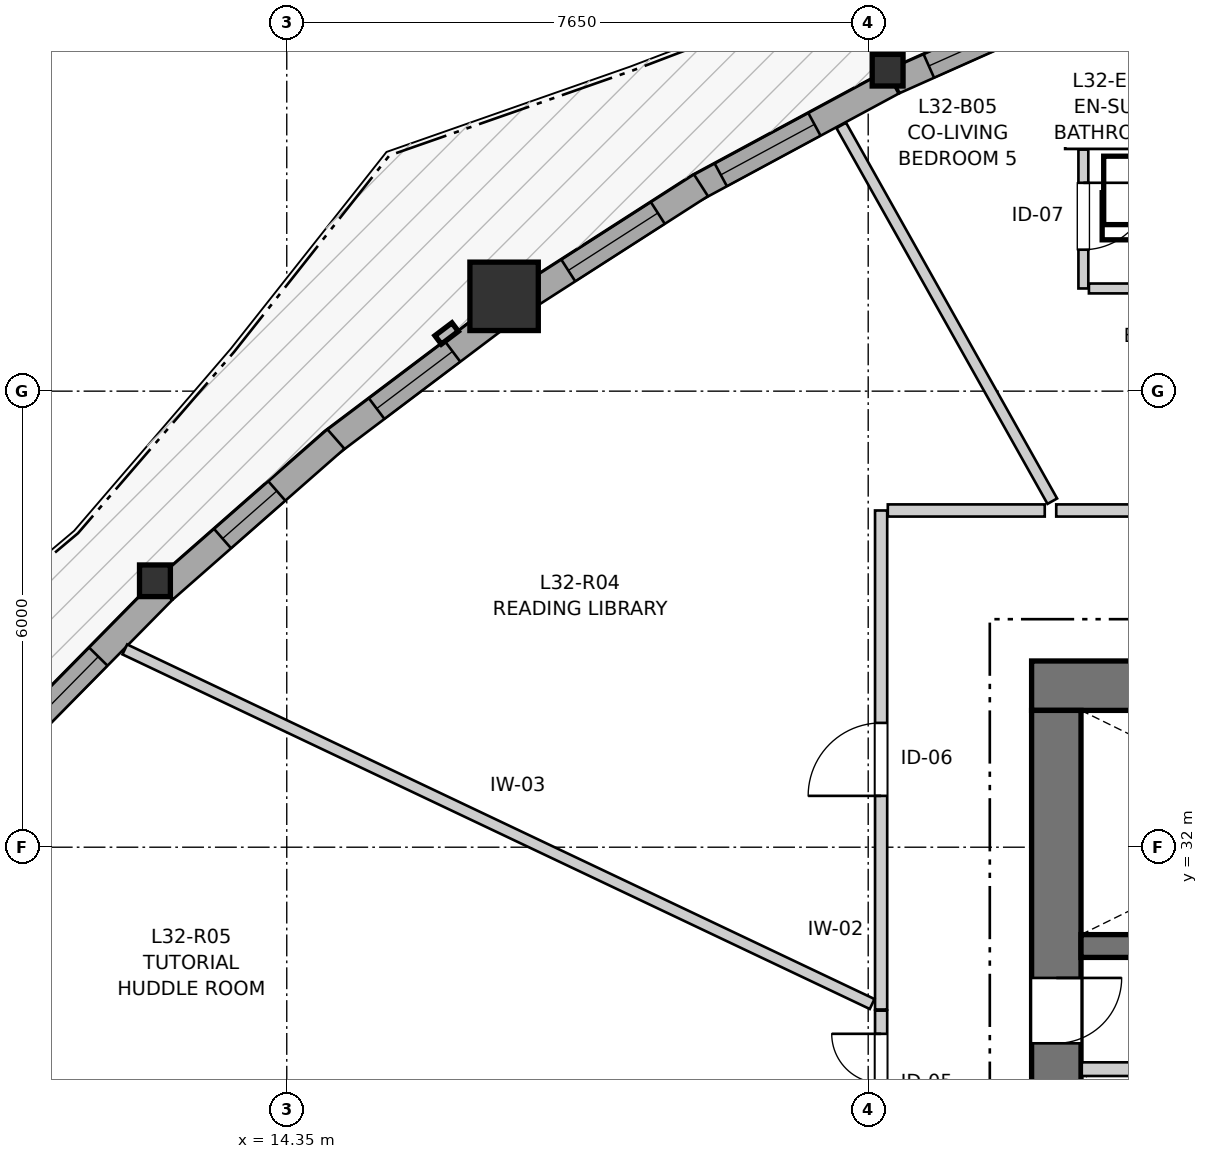
"""IFC4 building model, lengths in metres.
Left out: names, types, materials, properties, quantities, classifications, styles, units other than length and angle.
Written with IfcOpenShell. Run it as: python <this file> out.ifc"""

import sys

from ifc_helpers import new_model, si_unit, direction, frame, frame_2d, origin, origin_2d, place, context, subcontext, project, spatial, rectangle, i_section, extrude, source, transform, mapped, element, fill, save


model = new_model("IFC4")
c1 = context("Model", 3, precision=1e-05, world=origin(), true_north=direction((0.0, 1.0)))
c2 = subcontext(c1, "Body", "Model", "MODEL_VIEW")
j1 = project(units=[si_unit("LENGTHUNIT", "METRE"), si_unit("PLANEANGLEUNIT", "RADIAN")], contexts=[c1])
p1 = place(None, origin())
s1 = spatial("IfcSite", under=j1, at=p1, CompositionType="ELEMENT")
p2 = place(p1, origin())
s2 = spatial("IfcBuilding", under=s1, at=p2, CompositionType="ELEMENT")
p3 = place(p2, frame((0.0, 0.0, 108.8)))
s3 = spatial("IfcBuildingStorey", under=s2, at=p3, CompositionType="ELEMENT", Elevation=108.8)
p4 = place(p3, frame((36.55, 34.125, 0.0), z_axis=(0.0, 0.0, 1.0), x_axis=(-1.0, 0.0, 0.0)))
e1 = element("IfcWall", 1, at=p4, inside=s3, PredefinedType="SHEAR", context=c2, shape_type="SweptSolid", body=[
    extrude(rectangle(XDim=12.4, YDim=0.65, at=frame_2d((6.2, 0.0))), origin(), (0.0, 0.0, 1.0), 2.935),
])
p5 = place(p3, frame((24.475, 33.8, 0.0), z_axis=(0.0, 0.0, 1.0), x_axis=(0.0, -1.0, 0.0)))
e2 = element("IfcWall", 2, at=p5, inside=s3, PredefinedType="SHEAR", context=c2, shape_type="SweptSolid", body=[
    extrude(rectangle(XDim=15.6, YDim=0.65, at=frame_2d((7.8, 0.0))), origin(), (0.0, 0.0, 1.0), 2.935),
])
p6 = place(p5, frame((7.05, 0.0, 0.0)))
e3 = element("IfcOpeningElement", 3, at=p6, cuts=e2, PredefinedType="OPENING", context=c2, shape_type="SweptSolid", body=[
    extrude(rectangle(XDim=1.5, YDim=2.15, at=frame_2d((0.75, 1.075))), frame((0.0, 0.335, 0.0), z_axis=(0.0, -1.0, 0.0), x_axis=(1.0, 0.0, 0.0)), (0.0, 0.0, 1.0), 0.67),
])
p7 = place(p5, frame((3.52, 0.0, 0.0)))
e4 = element("IfcOpeningElement", 4, at=p7, cuts=e2, PredefinedType="OPENING", context=c2, shape_type="SweptSolid", body=[
    extrude(rectangle(XDim=0.86, YDim=2.05, at=frame_2d((0.43, 1.025))), frame((0.0, 0.335, 0.0), z_axis=(0.0, -1.0, 0.0), x_axis=(1.0, 0.0, 0.0)), (0.0, 0.0, 1.0), 0.67),
])
p8 = place(p5, frame((11.22, 0.0, 0.0)))
e5 = element("IfcOpeningElement", 5, at=p8, cuts=e2, PredefinedType="OPENING", context=c2, shape_type="SweptSolid", body=[
    extrude(rectangle(XDim=0.86, YDim=2.05, at=frame_2d((0.43, 1.025))), frame((0.0, 0.335, 0.0), z_axis=(0.0, -1.0, 0.0), x_axis=(1.0, 0.0, 0.0)), (0.0, 0.0, 1.0), 0.67),
])
p9 = place(p3, frame((24.8, 30.7, 0.0), z_axis=(0.0, 0.0, 1.0), x_axis=(1.0, 0.0, 0.0)))
e6 = element("IfcWall", 6, at=p9, inside=s3, PredefinedType="SHEAR", context=c2, shape_type="SweptSolid", body=[
    extrude(rectangle(XDim=11.1, YDim=0.3, at=frame_2d((5.55, 0.0))), origin(), (0.0, 0.0, 1.0), 2.935),
])
p10 = place(p9, frame((6.22, 0.0, 0.0)))
e7 = element("IfcOpeningElement", 7, at=p10, cuts=e6, PredefinedType="OPENING", context=c2, shape_type="SweptSolid", body=[
    extrude(rectangle(XDim=0.98, YDim=2.15, at=frame_2d((0.49, 1.075))), frame((0.0, 0.16, 0.0), z_axis=(0.0, -1.0, 0.0), x_axis=(1.0, 0.0, 0.0)), (0.0, 0.0, 1.0), 0.32),
])
p11 = place(p9, frame((9.15, 0.0, 0.0)))
e8 = element("IfcOpeningElement", 8, at=p11, cuts=e6, PredefinedType="OPENING", context=c2, shape_type="SweptSolid", body=[
    extrude(rectangle(XDim=1.15, YDim=2.15, at=frame_2d((0.575, 1.075))), frame((0.0, 0.16, 0.0), z_axis=(0.0, -1.0, 0.0), x_axis=(1.0, 0.0, 0.0)), (0.0, 0.0, 1.0), 0.32),
])
m1 = source(origin(), c2, "Body", "SweptSolid", [
    extrude(i_section(OverallWidth=0.406, OverallDepth=0.416, WebThickness=0.027, FlangeThickness=0.044, FilletRadius=0.015, at=origin_2d()), origin(), (0.0, 0.0, 1.0), 2.935),
])
p12 = place(p3, frame((22.256, 42.222, 0.0), z_axis=(0.0, 0.0, 1.0), x_axis=(1.0, 0.0, 0.0)))
e9 = element("IfcColumn", 9, at=p12, inside=s3, PredefinedType="PILASTER", context=c2, shape_type="MappedRepresentation", body=[
    mapped(m1, transform((0.0, 0.0, 0.0), x_axis=(1.0, 0.0, 0.0), y_axis=(0.0, 1.0, 0.0), z_axis=(0.0, 0.0, 1.0), scale=1.0)),
])
m2 = source(origin(), c2, "Body", "SweptSolid", [
    extrude(rectangle(XDim=0.9, YDim=0.9, at=origin_2d()), origin(), (0.0, 0.0, 1.0), 2.935),
])
p13 = place(p3, frame((17.209, 39.247, 0.0), z_axis=(0.0, 0.0, 1.0), x_axis=(1.0, 0.0, 0.0)))
e10 = element("IfcColumn", 10, at=p13, inside=s3, PredefinedType="COLUMN", context=c2, shape_type="MappedRepresentation", body=[
    mapped(m2, transform((0.0, 0.0, 0.0), x_axis=(1.0, 0.0, 0.0), y_axis=(0.0, 1.0, 0.0), z_axis=(0.0, 0.0, 1.0), scale=1.0)),
])
p14 = place(p3, frame((12.616, 35.505, 0.0), z_axis=(0.0, 0.0, 1.0), x_axis=(1.0, 0.0, 0.0)))
e11 = element("IfcColumn", 11, at=p14, inside=s3, PredefinedType="PILASTER", context=c2, shape_type="MappedRepresentation", body=[
    mapped(m1, transform((0.0, 0.0, 0.0), x_axis=(1.0, 0.0, 0.0), y_axis=(0.0, 1.0, 0.0), z_axis=(0.0, 0.0, 1.0), scale=1.0)),
])
p15 = place(p3, frame((25.052, 43.283, 0.0), z_axis=(0.0, 0.0, 1.0), x_axis=(-0.913400340023, -0.407062426227, 0.0)))
e12 = element("IfcWall", 12, at=p15, inside=s3, PredefinedType="SOLIDWALL", context=c2, shape_type="SweptSolid", body=[
    extrude(rectangle(XDim=2.966, YDim=0.34, at=frame_2d((1.483, 0.0))), origin(), (0.0, 0.0, 1.0), 2.465),
])
p16 = place(p15, frame((0.518, 0.0, 0.82)))
e13 = element("IfcOpeningElement", 13, at=p16, cuts=e12, PredefinedType="OPENING", context=c2, shape_type="SweptSolid", body=[
    extrude(rectangle(XDim=1.95, YDim=1.4, at=frame_2d((0.975, 0.7))), frame((0.0, 0.18, 0.0), z_axis=(0.0, -1.0, 0.0), x_axis=(1.0, 0.0, 0.0)), (0.0, 0.0, 1.0), 0.36),
])
p17 = place(p3, frame((22.319, 42.063, 0.0), z_axis=(0.0, 0.0, 1.0), x_axis=(-0.880050731383, -0.4748796797, 0.0)))
e14 = element("IfcWall", 14, at=p17, inside=s3, PredefinedType="SOLIDWALL", context=c2, shape_type="SweptSolid", body=[
    extrude(rectangle(XDim=2.949, YDim=0.34, at=frame_2d((1.475, 0.0))), origin(), (0.0, 0.0, 1.0), 2.465),
])
p18 = place(p17, frame((1.166, 0.0, 0.82)))
e15 = element("IfcOpeningElement", 15, at=p18, cuts=e14, PredefinedType="OPENING", context=c2, shape_type="SweptSolid", body=[
    extrude(rectangle(XDim=1.4, YDim=1.35, at=frame_2d((0.7, 0.675))), frame((0.0, 0.18, 0.0), z_axis=(0.0, -1.0, 0.0), x_axis=(1.0, 0.0, 0.0)), (0.0, 0.0, 1.0), 0.36),
])
p19 = place(p3, frame((19.8, 40.708, 0.0), z_axis=(0.0, 0.0, 1.0), x_axis=(-0.841470838401, -0.540302533883, 0.0)))
e16 = element("IfcWall", 16, at=p19, inside=s3, PredefinedType="SOLIDWALL", context=c2, shape_type="SweptSolid", body=[
    extrude(rectangle(XDim=2.739, YDim=0.34, at=frame_2d((1.37, 0.0))), origin(), (0.0, 0.0, 1.0), 2.465),
])
p20 = place(p19, frame((0.675, 0.0, 0.82)))
e17 = element("IfcOpeningElement", 17, at=p20, cuts=e16, PredefinedType="OPENING", context=c2, shape_type="SweptSolid", body=[
    extrude(rectangle(XDim=1.4, YDim=1.35, at=frame_2d((0.7, 0.675))), frame((0.0, 0.18, 0.0), z_axis=(0.0, -1.0, 0.0), x_axis=(1.0, 0.0, 0.0)), (0.0, 0.0, 1.0), 0.36),
])
p21 = place(p3, frame((17.128, 38.973, 0.0), z_axis=(0.0, 0.0, 1.0), x_axis=(-0.798381200707, -0.602152354772, 0.0)))
e18 = element("IfcWall", 18, at=p21, inside=s3, PredefinedType="SOLIDWALL", context=c2, shape_type="SweptSolid", body=[
    extrude(rectangle(XDim=2.756, YDim=0.34, at=frame_2d((1.378, 0.0))), origin(), (0.0, 0.0, 1.0), 2.465),
])
p22 = place(p21, frame((0.748, 0.0, 0.82)))
e19 = element("IfcOpeningElement", 19, at=p22, cuts=e18, PredefinedType="OPENING", context=c2, shape_type="SweptSolid", body=[
    extrude(rectangle(XDim=1.25, YDim=1.35, at=frame_2d((0.625, 0.675))), frame((0.0, 0.18, 0.0), z_axis=(0.0, -1.0, 0.0), x_axis=(1.0, 0.0, 0.0)), (0.0, 0.0, 1.0), 0.36),
])
p23 = place(p3, frame((14.997, 37.37, 0.0), z_axis=(0.0, 0.0, 1.0), x_axis=(-0.751446130796, -0.659794447166, 0.0)))
e20 = element("IfcWall", 20, at=p23, inside=s3, PredefinedType="SOLIDWALL", context=c2, shape_type="SweptSolid", body=[
    extrude(rectangle(XDim=3.0, YDim=0.34, at=frame_2d((1.5, 0.0))), origin(), (0.0, 0.0, 1.0), 2.465),
])
p24 = place(p23, frame((1.035, 0.0, 0.82)))
e21 = element("IfcOpeningElement", 21, at=p24, cuts=e20, PredefinedType="OPENING", context=c2, shape_type="SweptSolid", body=[
    extrude(rectangle(XDim=0.95, YDim=1.35, at=frame_2d((0.475, 0.675))), frame((0.0, 0.18, 0.0), z_axis=(0.0, -1.0, 0.0), x_axis=(1.0, 0.0, 0.0)), (0.0, 0.0, 1.0), 0.36),
])
p25 = place(p3, frame((12.723, 35.372, 0.0), z_axis=(0.0, 0.0, 1.0), x_axis=(-0.701922597509, -0.71225323243, 0.0)))
e22 = element("IfcWall", 22, at=p25, inside=s3, PredefinedType="SOLIDWALL", context=c2, shape_type="SweptSolid", body=[
    extrude(rectangle(XDim=3.049, YDim=0.34, at=frame_2d((1.524, 0.0))), origin(), (0.0, 0.0, 1.0), 2.465),
])
p26 = place(p25, frame((1.214, 0.0, 0.82)))
e23 = element("IfcOpeningElement", 23, at=p26, cuts=e22, PredefinedType="OPENING", context=c2, shape_type="SweptSolid", body=[
    extrude(rectangle(XDim=1.45, YDim=1.25, at=frame_2d((0.725, 0.625))), frame((0.0, 0.18, 0.0), z_axis=(0.0, -1.0, 0.0), x_axis=(1.0, 0.0, 0.0)), (0.0, 0.0, 1.0), 0.36),
])
p27 = place(p3, frame((24.81, 29.08, 0.0), z_axis=(0.0, 0.0, 1.0), x_axis=(1.0, 0.0, 0.0)))
e24 = element("IfcWall", 24, at=p27, inside=s3, PredefinedType="PARTITIONING", context=c2, shape_type="SweptSolid", body=[
    extrude(rectangle(XDim=5.84, YDim=0.18, at=frame_2d((2.92, 0.0))), origin(), (0.0, 0.0, 1.0), 2.935),
])
p28 = place(p3, frame((22.17, 29.865, 0.0), z_axis=(0.0, 0.0, 1.0), x_axis=(0.0, 1.0, 0.0)))
e25 = element("IfcWall", 25, at=p28, inside=s3, PredefinedType="PARTITIONING", context=c2, shape_type="SweptSolid", body=[
    extrude(rectangle(XDim=6.565, YDim=0.16, at=frame_2d((3.282, 0.0))), origin(), (0.0, 0.0, 1.0), 2.935),
])
p29 = place(p28, frame((2.811, 0.0, 0.0)))
e26 = element("IfcOpeningElement", 26, at=p29, cuts=e25, PredefinedType="OPENING", context=c2, shape_type="SweptSolid", body=[
    extrude(rectangle(XDim=0.96, YDim=2.1, at=frame_2d((0.48, 1.05))), frame((0.0, 0.09, 0.0), z_axis=(0.0, -1.0, 0.0), x_axis=(1.0, 0.0, 0.0)), (0.0, 0.0, 1.0), 0.18),
])
p30 = place(p3, frame((24.474, 36.43, 0.0), z_axis=(0.0, 0.0, 1.0), x_axis=(1.0, 0.0, 0.0)))
e27 = element("IfcWall", 27, at=p30, inside=s3, PredefinedType="PARTITIONING", context=c2, shape_type="SweptSolid", body=[
    extrude(rectangle(XDim=2.914, YDim=0.16, at=frame_2d((1.457, 0.0))), origin(), (0.0, 0.0, 1.0), 2.573),
])
p31 = place(p30, frame((0.998, 0.0, 0.0)))
e28 = element("IfcOpeningElement", 28, at=p31, cuts=e27, PredefinedType="OPENING", context=c2, shape_type="SweptSolid", body=[
    extrude(rectangle(XDim=0.92, YDim=2.1, at=frame_2d((0.46, 1.05))), frame((0.0, 0.09, 0.0), z_axis=(0.0, -1.0, 0.0), x_axis=(1.0, 0.0, 0.0)), (0.0, 0.0, 1.0), 0.18),
])
p32 = place(p3, frame((22.17, 27.85, 0.0), z_axis=(0.0, 0.0, 1.0), x_axis=(0.0, 1.0, 0.0)))
e29 = element("IfcWall", 29, at=p32, inside=s3, PredefinedType="PARTITIONING", context=c2, shape_type="SweptSolid", body=[
    extrude(rectangle(XDim=2.0, YDim=0.16, at=frame_2d((1.0, 0.0))), origin(), (0.0, 0.0, 1.0), 2.935),
])
p33 = place(p32, frame((0.395, 0.0, 0.0)))
e30 = element("IfcOpeningElement", 30, at=p33, cuts=e29, PredefinedType="OPENING", context=c2, shape_type="SweptSolid", body=[
    extrude(rectangle(XDim=1.3, YDim=2.1, at=frame_2d((0.65, 1.05))), frame((0.0, 0.09, 0.0), z_axis=(0.0, -1.0, 0.0), x_axis=(1.0, 0.0, 0.0)), (0.0, 0.0, 1.0), 0.18),
])
p34 = place(p3, frame((24.831, 41.178, 0.0), z_axis=(0.0, 0.0, 1.0), x_axis=(0.0, -1.0, 0.0)))
e31 = element("IfcWall", 31, at=p34, inside=s3, PredefinedType="PARTITIONING", context=c2, shape_type="SweptSolid", body=[
    extrude(rectangle(XDim=1.827, YDim=0.13, at=frame_2d((0.914, 0.0))), origin(), (0.0, 0.0, 1.0), 2.935),
])
p35 = place(p34, frame((0.437, 0.0, 0.0)))
e32 = element("IfcOpeningElement", 32, at=p35, cuts=e31, PredefinedType="OPENING", context=c2, shape_type="SweptSolid", body=[
    extrude(rectangle(XDim=0.88, YDim=2.05, at=frame_2d((0.44, 1.025))), frame((0.0, 0.075, 0.0), z_axis=(0.0, -1.0, 0.0), x_axis=(1.0, 0.0, 0.0)), (0.0, 0.0, 1.0), 0.15),
])
p36 = place(p3, frame((12.219, 34.602, 0.0), z_axis=(0.0, 0.0, 1.0), x_axis=(0.90346129999, -0.428669662351, 0.0)))
e33 = element("IfcWall", 33, at=p36, inside=s3, PredefinedType="PARTITIONING", context=c2, shape_type="SweptSolid", body=[
    extrude(rectangle(XDim=10.883, YDim=0.145, at=frame_2d((5.441, 0.0))), origin(), (0.0, 0.0, 1.0), 2.935),
])
p37 = place(p3, frame((21.645, 41.497, 0.0), z_axis=(0.0, 0.0, 1.0), x_axis=(0.489699005063, -0.871891555436, 0.0)))
e34 = element("IfcWall", 34, at=p37, inside=s3, PredefinedType="PARTITIONING", context=c2, shape_type="SweptSolid", body=[
    extrude(rectangle(XDim=5.671, YDim=0.145, at=frame_2d((2.835, 0.0))), origin(), (0.0, 0.0, 1.0), 2.935),
])
p38 = place(p3, frame((22.258, 36.43, 0.0), z_axis=(0.0, 0.0, 1.0), x_axis=(1.0, 0.0, 0.0)))
e35 = element("IfcWall", 35, at=p38, inside=s3, PredefinedType="PARTITIONING", context=c2, shape_type="SweptSolid", body=[
    extrude(rectangle(XDim=2.065, YDim=0.16, at=frame_2d((1.032, 0.0))), origin(), (0.0, 0.0, 1.0), 2.935),
])
p39 = place(p3, frame((24.904, 39.351, 0.0), z_axis=(0.0, 0.0, 1.0), x_axis=(1.0, 0.0, 0.0)))
e36 = element("IfcWall", 36, at=p39, inside=s3, PredefinedType="PARTITIONING", context=c2, shape_type="SweptSolid", body=[
    extrude(rectangle(XDim=1.533, YDim=0.13, at=frame_2d((0.767, 0.0))), origin(), (0.0, 0.0, 1.0), 2.935),
])
p40 = place(p3, frame((25.433, 43.222, 0.0), z_axis=(0.0, 0.0, 1.0), x_axis=(0.274641170969, -0.961546788882, 0.0)))
e37 = element("IfcWall", 37, at=p40, inside=s3, PredefinedType="PARTITIONING", context=c2, shape_type="SweptSolid", body=[
    extrude(rectangle(XDim=1.21, YDim=0.145, at=frame_2d((0.605, 0.0))), origin(), (0.0, 0.0, 1.0), 2.935),
])
p41 = place(p3, frame((24.591, 41.251, 0.0), z_axis=(0.0, 0.0, 1.0), x_axis=(1.0, 0.0, 0.0)))
e38 = element("IfcWall", 38, at=p41, inside=s3, PredefinedType="PARTITIONING", context=c2, shape_type="SweptSolid", body=[
    extrude(rectangle(XDim=1.215, YDim=0.13, at=frame_2d((0.607, 0.0))), origin(), (0.0, 0.0, 1.0), 2.935),
])
m3 = source(origin(), c2, "Body", "SweptSolid", [
    extrude(rectangle(XDim=1.95, YDim=1.4, at=frame_2d((0.975, 0.7))), frame((0.0, 0.03, 0.0), z_axis=(0.0, -1.0, 0.0), x_axis=(1.0, 0.0, 0.0)), (0.0, 0.0, 1.0), 0.06),
])
p42 = place(p16, origin())
e39 = element("IfcWindow", 39, at=p42, inside=s3, PartitioningType="SINGLE_PANEL", PredefinedType="WINDOW", context=c2, shape_type="MappedRepresentation", body=[
    mapped(m3, transform((0.0, 0.0, 0.0), x_axis=(1.0, 0.0, 0.0), y_axis=(0.0, 1.0, 0.0), z_axis=(0.0, 0.0, 1.0), scale=1.0)),
])
fill(e13, e39)
m4 = source(origin(), c2, "Body", "SweptSolid", [
    extrude(rectangle(XDim=1.4, YDim=1.35, at=frame_2d((0.7, 0.675))), frame((0.0, 0.03, 0.0), z_axis=(0.0, -1.0, 0.0), x_axis=(1.0, 0.0, 0.0)), (0.0, 0.0, 1.0), 0.06),
])
p43 = place(p18, origin())
e40 = element("IfcWindow", 40, at=p43, inside=s3, PartitioningType="SINGLE_PANEL", PredefinedType="WINDOW", context=c2, shape_type="MappedRepresentation", body=[
    mapped(m4, transform((0.0, 0.0, 0.0), x_axis=(1.0, 0.0, 0.0), y_axis=(0.0, 1.0, 0.0), z_axis=(0.0, 0.0, 1.0), scale=1.0)),
])
fill(e15, e40)
p44 = place(p20, origin())
e41 = element("IfcWindow", 41, at=p44, inside=s3, PartitioningType="SINGLE_PANEL", PredefinedType="WINDOW", context=c2, shape_type="MappedRepresentation", body=[
    mapped(m4, transform((0.0, 0.0, 0.0), x_axis=(1.0, 0.0, 0.0), y_axis=(0.0, 1.0, 0.0), z_axis=(0.0, 0.0, 1.0), scale=1.0)),
])
fill(e17, e41)
m5 = source(origin(), c2, "Body", "SweptSolid", [
    extrude(rectangle(XDim=1.25, YDim=1.35, at=frame_2d((0.625, 0.675))), frame((0.0, 0.03, 0.0), z_axis=(0.0, -1.0, 0.0), x_axis=(1.0, 0.0, 0.0)), (0.0, 0.0, 1.0), 0.06),
])
p45 = place(p22, origin())
e42 = element("IfcWindow", 42, at=p45, inside=s3, PartitioningType="SINGLE_PANEL", PredefinedType="WINDOW", context=c2, shape_type="MappedRepresentation", body=[
    mapped(m5, transform((0.0, 0.0, 0.0), x_axis=(1.0, 0.0, 0.0), y_axis=(0.0, 1.0, 0.0), z_axis=(0.0, 0.0, 1.0), scale=1.0)),
])
fill(e19, e42)
m6 = source(origin(), c2, "Body", "SweptSolid", [
    extrude(rectangle(XDim=0.95, YDim=1.35, at=frame_2d((0.475, 0.675))), frame((0.0, 0.03, 0.0), z_axis=(0.0, -1.0, 0.0), x_axis=(1.0, 0.0, 0.0)), (0.0, 0.0, 1.0), 0.06),
])
p46 = place(p24, origin())
e43 = element("IfcWindow", 43, at=p46, inside=s3, PartitioningType="SINGLE_PANEL", PredefinedType="WINDOW", context=c2, shape_type="MappedRepresentation", body=[
    mapped(m6, transform((0.0, 0.0, 0.0), x_axis=(1.0, 0.0, 0.0), y_axis=(0.0, 1.0, 0.0), z_axis=(0.0, 0.0, 1.0), scale=1.0)),
])
fill(e21, e43)
m7 = source(origin(), c2, "Body", "SweptSolid", [
    extrude(rectangle(XDim=1.45, YDim=1.25, at=frame_2d((0.725, 0.625))), frame((0.0, 0.03, 0.0), z_axis=(0.0, -1.0, 0.0), x_axis=(1.0, 0.0, 0.0)), (0.0, 0.0, 1.0), 0.06),
])
p47 = place(p26, origin())
e44 = element("IfcWindow", 44, at=p47, inside=s3, PartitioningType="SINGLE_PANEL", PredefinedType="WINDOW", context=c2, shape_type="MappedRepresentation", body=[
    mapped(m7, transform((0.0, 0.0, 0.0), x_axis=(1.0, 0.0, 0.0), y_axis=(0.0, 1.0, 0.0), z_axis=(0.0, 0.0, 1.0), scale=1.0)),
])
fill(e23, e44)
m8 = source(origin(), c2, "Body", "SweptSolid", [
    extrude(rectangle(XDim=0.86, YDim=2.05, at=frame_2d((0.43, 1.025))), frame((0.0, 0.025, 0.0), z_axis=(0.0, -1.0, 0.0), x_axis=(1.0, 0.0, 0.0)), (0.0, 0.0, 1.0), 0.05),
])
p48 = place(p7, origin())
e45 = element("IfcDoor", 45, at=p48, inside=s3, OperationType="SINGLE_SWING_LEFT", PredefinedType="DOOR", context=c2, shape_type="MappedRepresentation", body=[
    mapped(m8, transform((0.0, 0.0, 0.0), x_axis=(1.0, 0.0, 0.0), y_axis=(0.0, 1.0, 0.0), z_axis=(0.0, 0.0, 1.0), scale=1.0)),
])
fill(e4, e45)
m9 = source(origin(), c2, "Body", "SweptSolid", [
    extrude(rectangle(XDim=0.96, YDim=2.1, at=frame_2d((0.48, 1.05))), frame((0.0, 0.025, 0.0), z_axis=(0.0, -1.0, 0.0), x_axis=(1.0, 0.0, 0.0)), (0.0, 0.0, 1.0), 0.05),
])
p49 = place(p29, origin())
e46 = element("IfcDoor", 46, at=p49, inside=s3, OperationType="SINGLE_SWING_LEFT", PredefinedType="DOOR", context=c2, shape_type="MappedRepresentation", body=[
    mapped(m9, transform((0.0, 0.0, 0.0), x_axis=(1.0, 0.0, 0.0), y_axis=(0.0, 1.0, 0.0), z_axis=(0.0, 0.0, 1.0), scale=1.0)),
])
fill(e26, e46)
m10 = source(origin(), c2, "Body", "SweptSolid", [
    extrude(rectangle(XDim=1.3, YDim=2.1, at=frame_2d((0.65, 1.05))), frame((0.0, 0.025, 0.0), z_axis=(0.0, -1.0, 0.0), x_axis=(1.0, 0.0, 0.0)), (0.0, 0.0, 1.0), 0.05),
])
p50 = place(p33, origin())
e47 = element("IfcDoor", 47, at=p50, inside=s3, OperationType="DOUBLE_DOOR_SINGLE_SWING", PredefinedType="DOOR", context=c2, shape_type="MappedRepresentation", body=[
    mapped(m10, transform((0.0, 0.0, 0.0), x_axis=(1.0, 0.0, 0.0), y_axis=(0.0, 1.0, 0.0), z_axis=(0.0, 0.0, 1.0), scale=1.0)),
])
fill(e30, e47)
m11 = source(origin(), c2, "Body", "SweptSolid", [
    extrude(rectangle(XDim=0.88, YDim=2.05, at=frame_2d((0.44, 1.025))), frame((0.0, 0.025, 0.0), z_axis=(0.0, -1.0, 0.0), x_axis=(1.0, 0.0, 0.0)), (0.0, 0.0, 1.0), 0.05),
])
p51 = place(p35, origin())
e48 = element("IfcDoor", 48, at=p51, inside=s3, OperationType="SINGLE_SWING_LEFT", PredefinedType="DOOR", context=c2, shape_type="MappedRepresentation", body=[
    mapped(m11, transform((0.0, 0.0, 0.0), x_axis=(1.0, 0.0, 0.0), y_axis=(0.0, 1.0, 0.0), z_axis=(0.0, 0.0, 1.0), scale=1.0)),
])
fill(e32, e48)
save(model, sys.argv[1])
